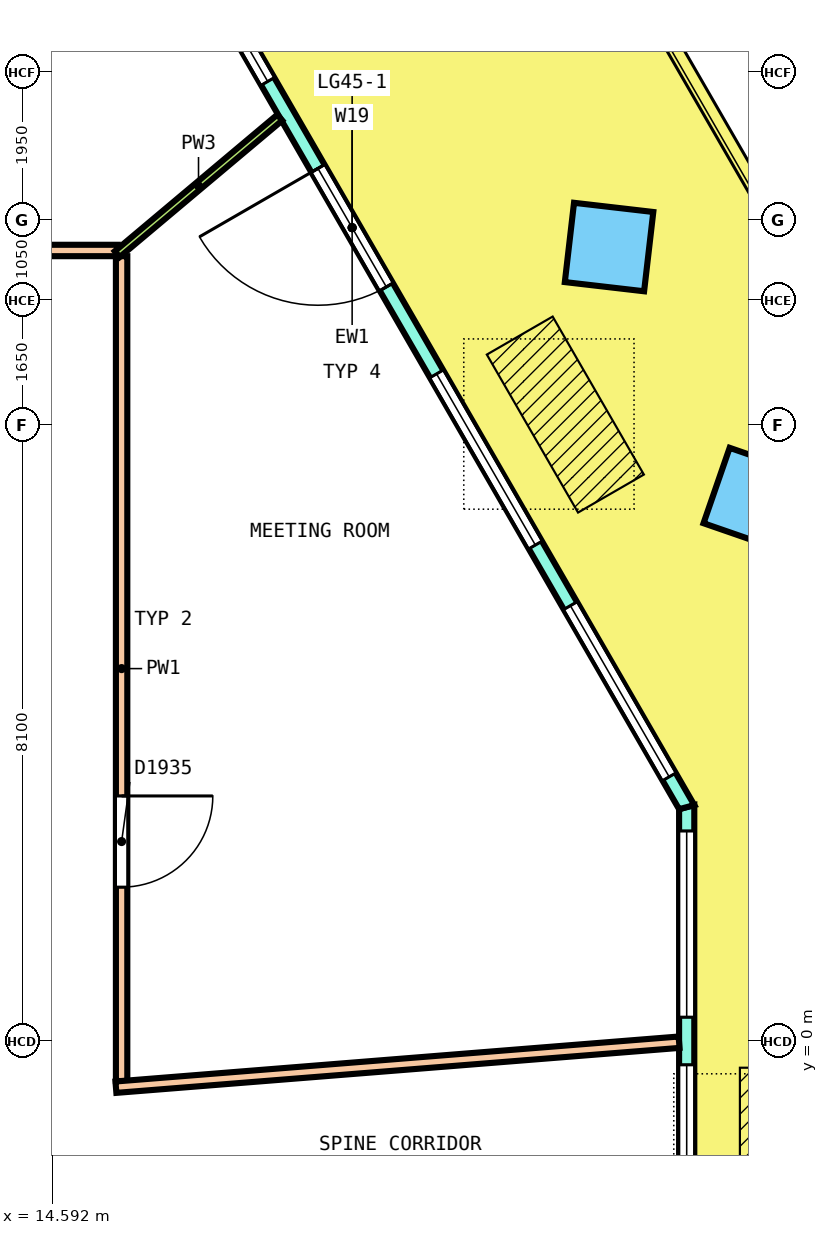
"""IFC4 building model, lengths in metres.
Left out: names, types, materials, properties, quantities, classifications, styles, units other than length and angle.
Written with IfcOpenShell. Run it as: python <this file> out.ifc"""

import sys

from ifc_helpers import new_model, si_unit, direction, frame, frame_2d, origin, origin_2d, place, context, subcontext, project, spatial, polyline, rectangle, outline, extrude, element, fill, save


model = new_model("IFC4")
c1 = context("Model", 3, precision=1e-05, world=origin(), true_north=direction((0.0, 1.0)))
c2 = subcontext(c1, "Body", "Model", "MODEL_VIEW")
j1 = project(units=[si_unit("LENGTHUNIT", "METRE"), si_unit("PLANEANGLEUNIT", "RADIAN")], contexts=[c1])
p1 = place(None, origin())
s1 = spatial("IfcSite", under=j1, at=p1, CompositionType="ELEMENT")
p2 = place(p1, origin())
s2 = spatial("IfcBuilding", under=s1, at=p2, CompositionType="ELEMENT")
p3 = place(p2, frame((0.0, 0.0, 211.4)))
s3 = spatial("IfcBuildingStorey", under=s2, at=p3, CompositionType="ELEMENT", Elevation=211.4)
p4 = place(p3, frame((23.824, 7.136, 0.0), z_axis=(0.021792492936, 0.025134899828, 0.999446508855), x_axis=(-0.499665392548, 0.866150076023, -0.010887667087)))
e1 = element("IfcColumn", 1, at=p4, inside=s3, PredefinedType="COLUMN", context=c2, shape_type="SweptSolid", body=[
    extrude(rectangle(XDim=1.05, YDim=1.05, at=origin_2d()), origin(), (0.0, 0.0, 1.0), 3.652),
])
p5 = place(p3, frame((21.913, 10.445, 0.0), z_axis=(0.025403639223, 0.018852174371, 0.999499500068), x_axis=(-0.49953538034, 0.866285825257, -0.003643178262)))
e2 = element("IfcColumn", 2, at=p5, inside=s3, PredefinedType="COLUMN", context=c2, shape_type="SweptSolid", body=[
    extrude(rectangle(XDim=1.05, YDim=1.05, at=origin_2d()), origin(), (0.0, 0.0, 1.0), 3.652),
])
p6 = place(p3, frame((22.934, -3.076, 0.0), z_axis=(0.0, 0.0, 1.0), x_axis=(0.0, 1.0, 0.0)))
e3 = element("IfcWall", 3, at=p6, inside=s3, PredefinedType="SOLIDWALL", context=c2, shape_type="SweptSolid", body=[
    extrude(outline(polyline([(-0.027, -0.1), (1.008, -0.1), (2.042, -0.1), (3.076, -0.1), (4.111, -0.1), (5.145, -0.1), (6.18, -0.1), (6.126, 0.1), (5.109, 0.1), (4.093, 0.1), (3.076, 0.1), (2.06, 0.1), (1.043, 0.1), (0.027, 0.1), (-0.027, -0.1)])), origin(), (0.0, 0.0, 1.0), 3.7),
])
p7 = place(p6, frame((0.313, 0.0, 0.1)))
e4 = element("IfcOpeningElement", 4, at=p7, cuts=e3, PredefinedType="OPENING", context=c2, shape_type="SweptSolid", body=[
    extrude(rectangle(XDim=2.45, YDim=2.65, at=frame_2d((1.225, 1.325))), frame((0.0, 0.11, 0.0), z_axis=(0.0, -1.0, 0.0), x_axis=(1.0, 0.0, 0.0)), (0.0, 0.0, 1.0), 0.22),
])
p8 = place(p6, frame((3.39, 0.0, 0.1)))
e5 = element("IfcOpeningElement", 5, at=p8, cuts=e3, PredefinedType="OPENING", context=c2, shape_type="SweptSolid", body=[
    extrude(rectangle(XDim=2.45, YDim=2.65, at=frame_2d((1.225, 1.325))), frame((0.0, 0.11, 0.0), z_axis=(0.0, -1.0, 0.0), x_axis=(1.0, 0.0, 0.0)), (0.0, 0.0, 1.0), 0.22),
])
p9 = place(p3, frame((22.934, 3.076, 0.0), z_axis=(0.0, 0.0, 1.0), x_axis=(-0.499992938033, 0.866029480975, 0.0)))
e6 = element("IfcWall", 6, at=p9, inside=s3, PredefinedType="SOLIDWALL", context=c2, shape_type="SweptSolid", body=[
    extrude(outline(polyline([(-0.027, -0.1), (1.012, -0.1), (2.051, -0.1), (3.09, -0.1), (4.128, -0.1), (5.167, -0.1), (6.206, -0.1), (7.245, -0.1), (8.283, -0.1), (9.322, -0.1), (10.361, -0.1), (11.4, -0.1), (12.439, -0.1), (13.477, -0.1), (14.516, -0.1), (15.555, -0.1), (16.594, -0.1), (17.633, -0.1), (17.579, 0.1), (16.546, 0.1), (15.514, 0.1), (14.481, 0.1), (13.449, 0.1), (12.417, 0.1), (11.384, 0.1), (10.352, 0.1), (9.319, 0.1), (8.287, 0.1), (7.254, 0.1), (6.222, 0.1), (5.189, 0.1), (4.157, 0.1), (3.124, 0.1), (2.092, 0.1), (1.059, 0.1), (0.027, 0.1), (-0.027, -0.1)])), origin(), (0.0, 0.0, 1.0), 3.7),
])
p10 = place(p9, frame((0.461, 0.0, 0.1)))
e7 = element("IfcOpeningElement", 7, at=p10, cuts=e6, PredefinedType="OPENING", context=c2, shape_type="SweptSolid", body=[
    extrude(rectangle(XDim=2.6, YDim=2.65, at=frame_2d((1.3, 1.325))), frame((0.0, 0.11, 0.0), z_axis=(0.0, -1.0, 0.0), x_axis=(1.0, 0.0, 0.0)), (0.0, 0.0, 1.0), 0.22),
])
p11 = place(p9, frame((3.982, 0.0, 0.1)))
e8 = element("IfcOpeningElement", 8, at=p11, cuts=e6, PredefinedType="OPENING", context=c2, shape_type="SweptSolid", body=[
    extrude(rectangle(XDim=2.6, YDim=2.65, at=frame_2d((1.3, 1.325))), frame((0.0, 0.11, 0.0), z_axis=(0.0, -1.0, 0.0), x_axis=(1.0, 0.0, 0.0)), (0.0, 0.0, 1.0), 0.22),
])
p12 = place(p9, frame((7.903, 0.0, 0.0)))
e9 = element("IfcOpeningElement", 9, at=p12, cuts=e6, PredefinedType="OPENING", context=c2, shape_type="SweptSolid", body=[
    extrude(rectangle(XDim=1.8, YDim=2.4, at=frame_2d((0.9, 1.2))), frame((0.0, 0.11, 0.0), z_axis=(0.0, -1.0, 0.0), x_axis=(1.0, 0.0, 0.0)), (0.0, 0.0, 1.0), 0.22),
])
p13 = place(p9, frame((7.903, 0.0, 2.55)))
e10 = element("IfcOpeningElement", 10, at=p13, cuts=e6, PredefinedType="OPENING", context=c2, shape_type="SweptSolid", body=[
    extrude(rectangle(XDim=1.8, YDim=0.2, at=frame_2d((0.9, 0.1))), frame((0.0, 0.11, 0.0), z_axis=(0.0, -1.0, 0.0), x_axis=(1.0, 0.0, 0.0)), (0.0, 0.0, 1.0), 0.22),
])
p14 = place(p9, frame((11.024, 0.0, 0.1)))
e11 = element("IfcOpeningElement", 11, at=p14, cuts=e6, PredefinedType="OPENING", context=c2, shape_type="SweptSolid", body=[
    extrude(rectangle(XDim=2.6, YDim=2.65, at=frame_2d((1.3, 1.325))), frame((0.0, 0.11, 0.0), z_axis=(0.0, -1.0, 0.0), x_axis=(1.0, 0.0, 0.0)), (0.0, 0.0, 1.0), 0.22),
])
p15 = place(p9, frame((14.545, 0.0, 0.1)))
e12 = element("IfcOpeningElement", 12, at=p15, cuts=e6, PredefinedType="OPENING", context=c2, shape_type="SweptSolid", body=[
    extrude(rectangle(XDim=2.6, YDim=2.65, at=frame_2d((1.3, 1.325))), frame((0.0, 0.11, 0.0), z_axis=(0.0, -1.0, 0.0), x_axis=(1.0, 0.0, 0.0)), (0.0, 0.0, 1.0), 0.22),
])
p16 = place(p3, frame((15.5, -0.527, 0.0), z_axis=(0.0, 0.0, 1.0), x_axis=(0.0, 1.0, 0.0)))
e13 = element("IfcWall", 13, at=p16, inside=s3, PredefinedType="PARTITIONING", context=c2, shape_type="SweptSolid", body=[
    extrude(rectangle(XDim=10.852, YDim=0.15, at=frame_2d((5.426, 0.0))), origin(), (0.0, 0.0, 1.0), 2.8),
])
p17 = place(p16, frame((2.55, 0.0, 0.0)))
e14 = element("IfcOpeningElement", 14, at=p17, cuts=e13, PredefinedType="OPENING", context=c2, shape_type="SweptSolid", body=[
    extrude(rectangle(XDim=1.2, YDim=2.1, at=frame_2d((0.6, 1.05))), frame((0.0, 0.085, 0.0), z_axis=(0.0, -1.0, 0.0), x_axis=(1.0, 0.0, 0.0)), (0.0, 0.0, 1.0), 0.17),
])
p18 = place(p3, frame((-15.425, 10.4, 0.0), z_axis=(0.0, 0.0, 1.0), x_axis=(1.0, 0.0, 0.0)))
e15 = element("IfcWall", 15, at=p18, inside=s3, PredefinedType="PARTITIONING", context=c2, shape_type="SweptSolid", body=[
    extrude(rectangle(XDim=30.875, YDim=0.15, at=frame_2d((15.438, 0.0))), origin(), (0.0, 0.0, 1.0), 2.8),
])
p19 = place(p18, frame((20.176, 0.0, 0.0)))
e16 = element("IfcOpeningElement", 16, at=p19, cuts=e15, PredefinedType="OPENING", context=c2, shape_type="SweptSolid", body=[
    extrude(rectangle(XDim=1.2, YDim=2.1, at=frame_2d((0.6, 1.05))), frame((0.0, 0.085, 0.0), z_axis=(0.0, -1.0, 0.0), x_axis=(1.0, 0.0, 0.0)), (0.0, 0.0, 1.0), 0.17),
])
p20 = place(p18, frame((11.293, 0.0, 0.0)))
e17 = element("IfcOpeningElement", 17, at=p20, cuts=e15, PredefinedType="OPENING", context=c2, shape_type="SweptSolid", body=[
    extrude(rectangle(XDim=1.2, YDim=2.1, at=frame_2d((0.6, 1.05))), frame((0.0, 0.085, 0.0), z_axis=(0.0, -1.0, 0.0), x_axis=(1.0, 0.0, 0.0)), (0.0, 0.0, 1.0), 0.17),
])
p21 = place(p18, frame((3.376, 0.0, 0.0)))
e18 = element("IfcOpeningElement", 18, at=p21, cuts=e15, PredefinedType="OPENING", context=c2, shape_type="SweptSolid", body=[
    extrude(rectangle(XDim=1.2, YDim=2.1, at=frame_2d((0.6, 1.05))), frame((0.0, 0.085, 0.0), z_axis=(0.0, -1.0, 0.0), x_axis=(1.0, 0.0, 0.0)), (0.0, 0.0, 1.0), 0.17),
])
p22 = place(p3, frame((15.425, -0.608, 0.0), z_axis=(0.0, 0.0, 1.0), x_axis=(0.996827903335, 0.079587254837, 0.0)))
e19 = element("IfcWall", 19, at=p22, inside=s3, PredefinedType="PARTITIONING", context=c2, shape_type="SweptSolid", body=[
    extrude(rectangle(XDim=7.433, YDim=0.15, at=frame_2d((3.716, 0.0))), origin(), (0.0, 0.0, 1.0), 2.8),
])
p23 = place(p3, frame((15.443, 10.352, 0.0), z_axis=(0.0, 0.0, 1.0), x_axis=(0.765599818327, 0.643317121005, 0.0)))
e20 = element("IfcWall", 20, at=p23, inside=s3, PredefinedType="PARTITIONING", context=c2, shape_type="SweptSolid", body=[
    extrude(rectangle(XDim=2.793, YDim=0.1, at=frame_2d((1.396, 0.0))), origin(), (0.0, 0.0, 1.0), 2.8),
])
p24 = place(p7, origin())
e21 = element("IfcWindow", 21, at=p24, inside=s3, PartitioningType="SINGLE_PANEL", PredefinedType="WINDOW", context=c2, shape_type="SweptSolid", body=[
    extrude(rectangle(XDim=2.45, YDim=2.65, at=frame_2d((1.225, 1.325))), frame((0.0, 0.03, 0.0), z_axis=(0.0, -1.0, 0.0), x_axis=(1.0, 0.0, 0.0)), (0.0, 0.0, 1.0), 0.06),
])
fill(e4, e21)
p25 = place(p8, origin())
e22 = element("IfcWindow", 22, at=p25, inside=s3, PartitioningType="SINGLE_PANEL", PredefinedType="WINDOW", context=c2, shape_type="SweptSolid", body=[
    extrude(rectangle(XDim=2.45, YDim=2.65, at=frame_2d((1.225, 1.325))), frame((0.0, 0.03, 0.0), z_axis=(0.0, -1.0, 0.0), x_axis=(1.0, 0.0, 0.0)), (0.0, 0.0, 1.0), 0.06),
])
fill(e5, e22)
p26 = place(p10, origin())
e23 = element("IfcWindow", 23, at=p26, inside=s3, PartitioningType="SINGLE_PANEL", PredefinedType="WINDOW", context=c2, shape_type="SweptSolid", body=[
    extrude(rectangle(XDim=2.6, YDim=2.65, at=frame_2d((1.3, 1.325))), frame((0.0, 0.03, 0.0), z_axis=(0.0, -1.0, 0.0), x_axis=(1.0, 0.0, 0.0)), (0.0, 0.0, 1.0), 0.06),
])
fill(e7, e23)
p27 = place(p11, origin())
e24 = element("IfcWindow", 24, at=p27, inside=s3, PartitioningType="SINGLE_PANEL", PredefinedType="WINDOW", context=c2, shape_type="SweptSolid", body=[
    extrude(rectangle(XDim=2.6, YDim=2.65, at=frame_2d((1.3, 1.325))), frame((0.0, 0.03, 0.0), z_axis=(0.0, -1.0, 0.0), x_axis=(1.0, 0.0, 0.0)), (0.0, 0.0, 1.0), 0.06),
])
fill(e8, e24)
p28 = place(p12, origin())
e25 = element("IfcDoor", 25, at=p28, inside=s3, OperationType="DOUBLE_DOOR_SINGLE_SWING", PredefinedType="DOOR", context=c2, shape_type="SweptSolid", body=[
    extrude(rectangle(XDim=1.8, YDim=2.4, at=frame_2d((0.9, 1.2))), frame((0.0, 0.025, 0.0), z_axis=(0.0, -1.0, 0.0), x_axis=(1.0, 0.0, 0.0)), (0.0, 0.0, 1.0), 0.05),
])
fill(e9, e25)
p29 = place(p13, origin())
e26 = element("IfcWindow", 26, at=p29, inside=s3, PartitioningType="SINGLE_PANEL", PredefinedType="WINDOW", context=c2, shape_type="SweptSolid", body=[
    extrude(rectangle(XDim=1.8, YDim=0.2, at=frame_2d((0.9, 0.1))), frame((0.0, 0.03, 0.0), z_axis=(0.0, -1.0, 0.0), x_axis=(1.0, 0.0, 0.0)), (0.0, 0.0, 1.0), 0.06),
])
fill(e10, e26)
p30 = place(p14, origin())
e27 = element("IfcWindow", 27, at=p30, inside=s3, PartitioningType="SINGLE_PANEL", PredefinedType="WINDOW", context=c2, shape_type="SweptSolid", body=[
    extrude(rectangle(XDim=2.6, YDim=2.65, at=frame_2d((1.3, 1.325))), frame((0.0, 0.03, 0.0), z_axis=(0.0, -1.0, 0.0), x_axis=(1.0, 0.0, 0.0)), (0.0, 0.0, 1.0), 0.06),
])
fill(e11, e27)
p31 = place(p17, origin())
e28 = element("IfcDoor", 28, at=p31, inside=s3, OperationType="DOUBLE_DOOR_SINGLE_SWING", PredefinedType="DOOR", context=c2, shape_type="SweptSolid", body=[
    extrude(rectangle(XDim=1.2, YDim=2.1, at=frame_2d((0.6, 1.05))), frame((0.0, 0.025, 0.0), z_axis=(0.0, -1.0, 0.0), x_axis=(1.0, 0.0, 0.0)), (0.0, 0.0, 1.0), 0.05),
])
fill(e14, e28)
save(model, sys.argv[1])
